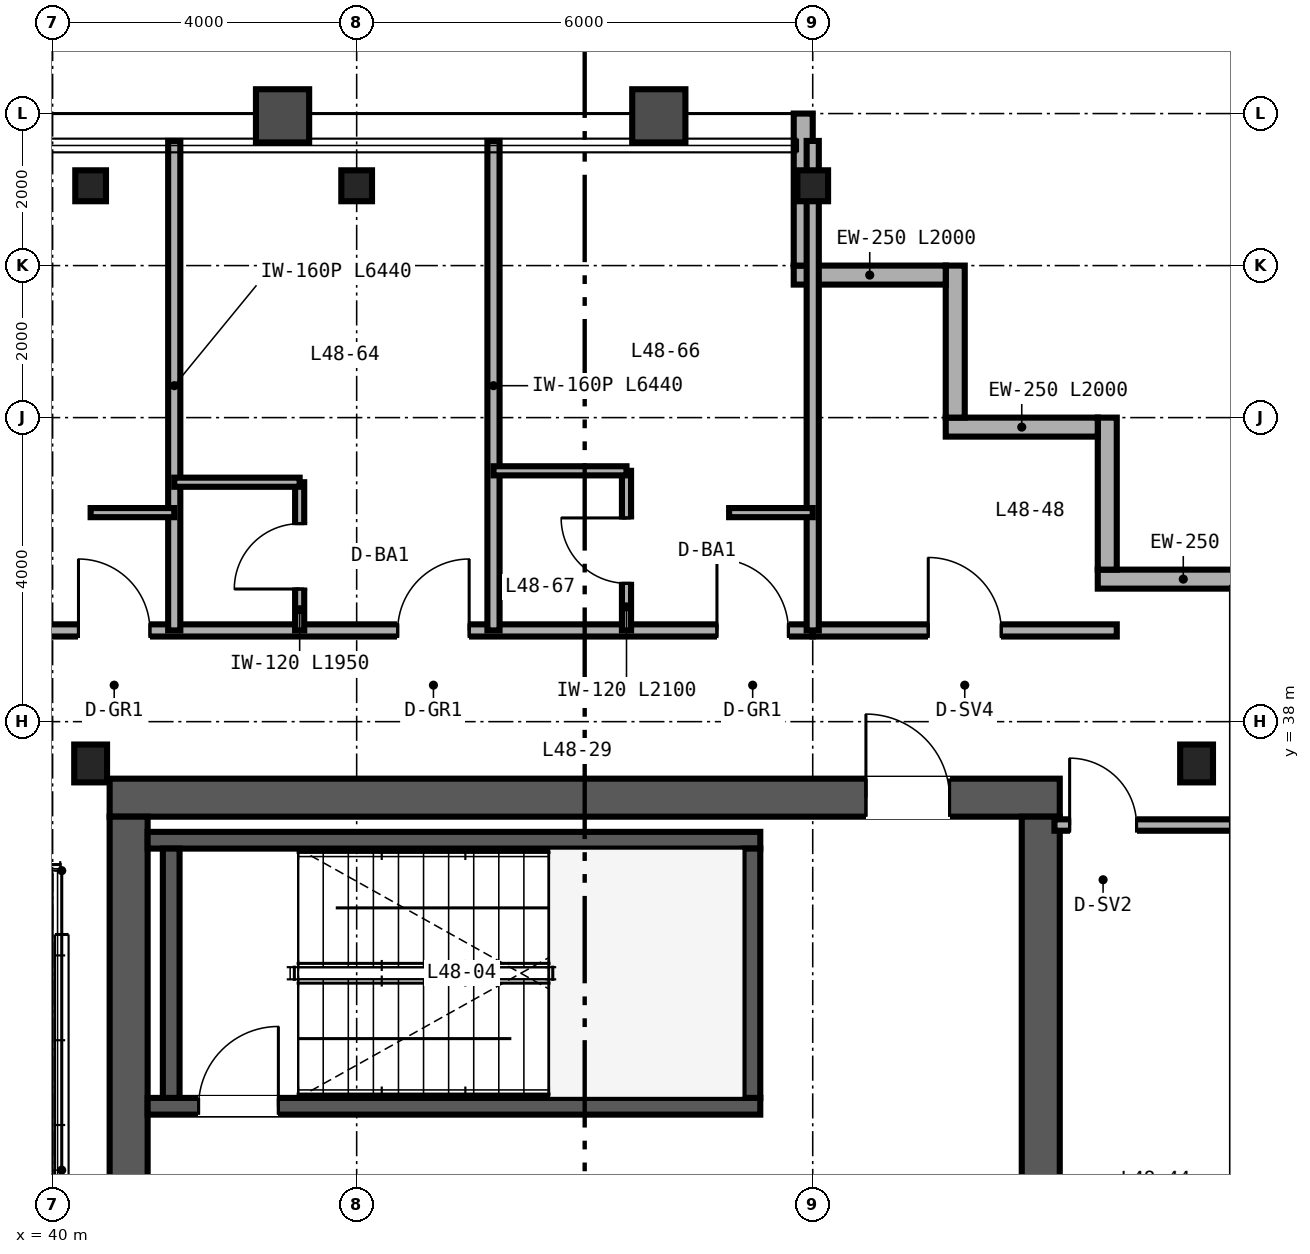
"""IFC4 building model, lengths in metres.
Left out: names, types, materials, properties, quantities, classifications, styles, units other than length and angle.
Written with IfcOpenShell. Run it as: python <this file> out.ifc"""

import sys

from ifc_helpers import new_model, si_unit, direction, frame, frame_2d, origin, origin_2d, place, context, subcontext, project, spatial, rectangle, i_section, extrude, source, transform, mapped, element, fill, save


model = new_model("IFC4")
c1 = context("Model", 3, precision=1e-05, world=origin(), true_north=direction((0.0, 1.0)))
c2 = subcontext(c1, "Body", "Model", "MODEL_VIEW")
j1 = project(units=[si_unit("LENGTHUNIT", "METRE"), si_unit("PLANEANGLEUNIT", "RADIAN")], contexts=[c1])
p1 = place(None, origin())
s1 = spatial("IfcSite", under=j1, at=p1, CompositionType="ELEMENT")
p2 = place(p1, origin())
s2 = spatial("IfcBuilding", under=s1, at=p2, CompositionType="ELEMENT")
p3 = place(p2, frame((0.0, 0.0, 192.0)))
s3 = spatial("IfcBuildingStorey", under=s2, at=p3, CompositionType="ELEMENT", Elevation=192.0)
p4 = place(p3, frame((40.75, 37.0, 0.0), z_axis=(0.0, 0.0, 1.0), x_axis=(1.0, 0.0, 0.0)))
e1 = element("IfcWall", 1, at=p4, inside=s3, PredefinedType="SHEAR", context=c2, shape_type="SweptSolid", body=[
    extrude(rectangle(XDim=12.5, YDim=0.5, at=frame_2d((6.25, 0.0))), origin(), (0.0, 0.0, 1.0), 3.37),
])
p5 = place(p4, frame((9.95, 0.0, 0.0)))
e2 = element("IfcOpeningElement", 2, at=p5, cuts=e1, PredefinedType="OPENING", context=c2, shape_type="SweptSolid", body=[
    extrude(rectangle(XDim=1.1, YDim=2.15, at=frame_2d((0.55, 1.075))), frame((0.0, 0.26, 0.0), z_axis=(0.0, -1.0, 0.0), x_axis=(1.0, 0.0, 0.0)), (0.0, 0.0, 1.0), 0.52),
])
for number, where, z_axis, x_axis in (
    (3, (41.0, 15.25, 0.0), (0.0, 0.0, 1.0), (0.0, 1.0, 0.0)),
    (4, (53.0, 15.25, 0.0), (0.0, 0.0, 1.0), (0.0, 1.0, 0.0)),
):
    element("IfcWall", number, at=place(p3, frame(where, z_axis=z_axis, x_axis=x_axis)), inside=s3, PredefinedType="SHEAR", context=c2, shape_type="SweptSolid", body=[
        extrude(rectangle(XDim=21.5, YDim=0.5, at=frame_2d((10.75, 0.0))), origin(), (0.0, 0.0, 1.0), 3.37),
    ])
p6 = place(p3, frame((41.25, 32.94, 0.0), z_axis=(0.0, 0.0, 1.0), x_axis=(1.0, 0.0, 0.0)))
e5 = element("IfcWall", 5, at=p6, inside=s3, PredefinedType="SHEAR", context=c2, shape_type="SweptSolid", body=[
    extrude(rectangle(XDim=8.06, YDim=0.22, at=frame_2d((4.03, 0.0))), origin(), (0.0, 0.0, 1.0), 3.4),
])
p7 = place(p6, frame((0.67, 0.0, 0.0)))
e6 = element("IfcOpeningElement", 6, at=p7, cuts=e5, PredefinedType="OPENING", context=c2, shape_type="SweptSolid", body=[
    extrude(rectangle(XDim=1.05, YDim=2.15, at=frame_2d((0.525, 1.075))), frame((0.0, 0.12, 0.0), z_axis=(0.0, -1.0, 0.0), x_axis=(1.0, 0.0, 0.0)), (0.0, 0.0, 1.0), 0.24),
])
p8 = place(p3, frame((41.25, 36.44, 0.0), z_axis=(0.0, 0.0, 1.0), x_axis=(1.0, 0.0, 0.0)))
e7 = element("IfcWall", 7, at=p8, inside=s3, PredefinedType="SHEAR", context=c2, shape_type="SweptSolid", body=[
    extrude(rectangle(XDim=8.06, YDim=0.22, at=frame_2d((4.03, 0.0))), origin(), (0.0, 0.0, 1.0), 3.4),
])
for number, where, z_axis, x_axis in (
    (8, (41.56, 33.05, 0.0), (0.0, 0.0, 1.0), (0.0, 1.0, 0.0)),
    (9, (49.2, 33.05, 0.0), (0.0, 0.0, 1.0), (0.0, 1.0, 0.0)),
):
    element("IfcWall", number, at=place(p3, frame(where, z_axis=z_axis, x_axis=x_axis)), inside=s3, PredefinedType="SHEAR", context=c2, shape_type="SweptSolid", body=[
        extrude(rectangle(XDim=3.28, YDim=0.22, at=frame_2d((1.64, 0.0))), origin(), (0.0, 0.0, 1.0), 3.4),
    ])
m1 = source(origin(), c2, "Body", "SweptSolid", [
    extrude(i_section(OverallWidth=0.432, OverallDepth=0.498, WebThickness=0.056, FlangeThickness=0.089, FilletRadius=0.025, at=origin_2d()), origin(), (0.0, 0.0, 1.0), 3.37),
])
for number, where, z_axis, x_axis in (
    (10, (40.5, 37.45, 0.0), (0.0, 0.0, 1.0), (1.0, 0.0, 0.0)),
    (11, (55.05, 37.45, 0.0), (0.0, 0.0, 1.0), (1.0, 0.0, 0.0)),
):
    element("IfcColumn", number, at=place(p3, frame(where, z_axis=z_axis, x_axis=x_axis)), inside=s3, PredefinedType="COLUMN", context=c2, shape_type="MappedRepresentation", body=[
        mapped(m1, transform((0.0, 0.0, 0.0), scale=1.0)),
    ])
m2 = source(origin(), c2, "Body", "SweptSolid", [
    extrude(i_section(OverallWidth=0.404, OverallDepth=0.407, WebThickness=0.027, FlangeThickness=0.044, FilletRadius=0.025, at=origin_2d()), origin(), (0.0, 0.0, 1.0), 3.37),
])
for number, where, z_axis, x_axis in (
    (12, (40.5, 45.05, 0.0), (0.0, 0.0, 1.0), (1.0, 0.0, 0.0)),
    (13, (44.0, 45.05, 0.0), (0.0, 0.0, 1.0), (1.0, 0.0, 0.0)),
    (14, (50.0, 45.05, 0.0), (0.0, 0.0, 1.0), (1.0, 0.0, 0.0)),
):
    element("IfcColumn", number, at=place(p3, frame(where, z_axis=z_axis, x_axis=x_axis)), inside=s3, PredefinedType="COLUMN", context=c2, shape_type="MappedRepresentation", body=[
        mapped(m2, transform((0.0, 0.0, 0.0), scale=1.0)),
    ])
p9 = place(p3, frame((56.0, 39.875, 0.0), z_axis=(0.0, 0.0, 1.0), x_axis=(-1.0, 0.0, 0.0)))
e15 = element("IfcWall", 15, at=p9, inside=s3, PredefinedType="SOLIDWALL", context=c2, shape_type="SweptSolid", body=[
    extrude(rectangle(XDim=2.25, YDim=0.25, at=frame_2d((1.125, 0.0))), origin(), (0.0, 0.0, 1.0), 3.37),
])
for number, where, z_axis, x_axis in (
    (16, (53.875, 40.0, 0.0), (0.0, 0.0, 1.0), (0.0, 1.0, 0.0)),
    (17, (53.75, 41.875, 0.0), (0.0, 0.0, 1.0), (-1.0, 0.0, 0.0)),
    (18, (51.875, 42.0, 0.0), (0.0, 0.0, 1.0), (0.0, 1.0, 0.0)),
    (19, (51.75, 43.875, 0.0), (0.0, 0.0, 1.0), (-1.0, 0.0, 0.0)),
):
    element("IfcWall", number, at=place(p3, frame(where, z_axis=z_axis, x_axis=x_axis)), inside=s3, PredefinedType="SOLIDWALL", context=c2, shape_type="SweptSolid", body=[
        extrude(rectangle(XDim=2.0, YDim=0.25, at=frame_2d((1.0, 0.0))), origin(), (0.0, 0.0, 1.0), 3.37),
    ])
p10 = place(p3, frame((49.875, 44.0, 0.0), z_axis=(0.0, 0.0, 1.0), x_axis=(0.0, 1.0, 0.0)))
e20 = element("IfcWall", 20, at=p10, inside=s3, PredefinedType="SOLIDWALL", context=c2, shape_type="SweptSolid", body=[
    extrude(rectangle(XDim=2.0, YDim=0.25, at=frame_2d((1.0, 0.0))), origin(), (0.0, 0.0, 1.0), 2.677),
])
p11 = place(p3, frame((53.18, 36.64, 0.0), z_axis=(0.0, 0.0, 1.0), x_axis=(1.0, 0.0, 0.0)))
e21 = element("IfcWall", 21, at=p11, inside=s3, PredefinedType="PARTITIONING", context=c2, shape_type="SweptSolid", body=[
    extrude(rectangle(XDim=2.66, YDim=0.15, at=frame_2d((1.33, 0.0))), origin(), (0.0, 0.0, 1.0), 2.753),
])
p12 = place(p11, frame((0.2, 0.0, 0.0)))
e22 = element("IfcOpeningElement", 22, at=p12, cuts=e21, PredefinedType="OPENING", context=c2, shape_type="SweptSolid", body=[
    extrude(rectangle(XDim=0.88, YDim=2.15, at=frame_2d((0.44, 1.075))), frame((0.0, 0.085, 0.0), z_axis=(0.0, -1.0, 0.0), x_axis=(1.0, 0.0, 0.0)), (0.0, 0.0, 1.0), 0.17),
])
p13 = place(p3, frame((50.0, 39.2, 0.0), z_axis=(0.0, 0.0, 1.0), x_axis=(1.0, 0.0, 0.0)))
e23 = element("IfcWall", 23, at=p13, inside=s3, PredefinedType="PARTITIONING", context=c2, shape_type="SweptSolid", body=[
    extrude(rectangle(XDim=4.0, YDim=0.16, at=frame_2d((2.0, 0.0))), origin(), (0.0, 0.0, 1.0), 3.37),
])
p14 = place(p13, frame((1.52, 0.0, 0.0)))
e24 = element("IfcOpeningElement", 24, at=p14, cuts=e23, PredefinedType="OPENING", context=c2, shape_type="SweptSolid", body=[
    extrude(rectangle(XDim=0.96, YDim=2.15, at=frame_2d((0.48, 1.075))), frame((0.0, 0.09, 0.0), z_axis=(0.0, -1.0, 0.0), x_axis=(1.0, 0.0, 0.0)), (0.0, 0.0, 1.0), 0.18),
])
p15 = place(p3, frame((14.0, 39.2, 0.0), z_axis=(0.0, 0.0, 1.0), x_axis=(1.0, 0.0, 0.0)))
e25 = element("IfcWall", 25, at=p15, inside=s3, PredefinedType="PARTITIONING", context=c2, shape_type="SweptSolid", body=[
    extrude(rectangle(XDim=36.0, YDim=0.16, at=frame_2d((18.0, 0.0))), origin(), (0.0, 0.0, 1.0), 2.913),
])
p16 = place(p15, frame((3.94, 0.0, 0.0)))
e26 = element("IfcOpeningElement", 26, at=p16, cuts=e25, PredefinedType="OPENING", context=c2, shape_type="SweptSolid", body=[
    extrude(rectangle(XDim=0.94, YDim=2.15, at=frame_2d((0.47, 1.075))), frame((0.0, 0.09, 0.0), z_axis=(0.0, -1.0, 0.0), x_axis=(1.0, 0.0, 0.0)), (0.0, 0.0, 1.0), 0.18),
])
p17 = place(p15, frame((9.14, 0.0, 0.0)))
e27 = element("IfcOpeningElement", 27, at=p17, cuts=e25, PredefinedType="OPENING", context=c2, shape_type="SweptSolid", body=[
    extrude(rectangle(XDim=0.94, YDim=2.15, at=frame_2d((0.47, 1.075))), frame((0.0, 0.09, 0.0), z_axis=(0.0, -1.0, 0.0), x_axis=(1.0, 0.0, 0.0)), (0.0, 0.0, 1.0), 0.18),
])
p18 = place(p15, frame((12.72, 0.0, 0.0)))
e28 = element("IfcOpeningElement", 28, at=p18, cuts=e25, PredefinedType="OPENING", context=c2, shape_type="SweptSolid", body=[
    extrude(rectangle(XDim=0.96, YDim=2.15, at=frame_2d((0.48, 1.075))), frame((0.0, 0.09, 0.0), z_axis=(0.0, -1.0, 0.0), x_axis=(1.0, 0.0, 0.0)), (0.0, 0.0, 1.0), 0.18),
])
p19 = place(p15, frame((18.42, 0.0, 0.0)))
e29 = element("IfcOpeningElement", 29, at=p19, cuts=e25, PredefinedType="OPENING", context=c2, shape_type="SweptSolid", body=[
    extrude(rectangle(XDim=0.96, YDim=2.15, at=frame_2d((0.48, 1.075))), frame((0.0, 0.09, 0.0), z_axis=(0.0, -1.0, 0.0), x_axis=(1.0, 0.0, 0.0)), (0.0, 0.0, 1.0), 0.18),
])
p20 = place(p15, frame((26.34, 0.0, 0.0)))
e30 = element("IfcOpeningElement", 30, at=p20, cuts=e25, PredefinedType="OPENING", context=c2, shape_type="SweptSolid", body=[
    extrude(rectangle(XDim=0.94, YDim=2.15, at=frame_2d((0.47, 1.075))), frame((0.0, 0.09, 0.0), z_axis=(0.0, -1.0, 0.0), x_axis=(1.0, 0.0, 0.0)), (0.0, 0.0, 1.0), 0.18),
])
p21 = place(p15, frame((30.54, 0.0, 0.0)))
e31 = element("IfcOpeningElement", 31, at=p21, cuts=e25, PredefinedType="OPENING", context=c2, shape_type="SweptSolid", body=[
    extrude(rectangle(XDim=0.94, YDim=2.15, at=frame_2d((0.47, 1.075))), frame((0.0, 0.09, 0.0), z_axis=(0.0, -1.0, 0.0), x_axis=(1.0, 0.0, 0.0)), (0.0, 0.0, 1.0), 0.18),
])
p22 = place(p15, frame((34.74, 0.0, 0.0)))
e32 = element("IfcOpeningElement", 32, at=p22, cuts=e25, PredefinedType="OPENING", context=c2, shape_type="SweptSolid", body=[
    extrude(rectangle(XDim=0.94, YDim=2.15, at=frame_2d((0.47, 1.075))), frame((0.0, 0.09, 0.0), z_axis=(0.0, -1.0, 0.0), x_axis=(1.0, 0.0, 0.0)), (0.0, 0.0, 1.0), 0.18),
])
p23 = place(p3, frame((50.0, 39.2, 0.0), z_axis=(0.0, 0.0, 1.0), x_axis=(0.0, 1.0, 0.0)))
e33 = element("IfcWall", 33, at=p23, inside=s3, PredefinedType="PARTITIONING", context=c2, shape_type="SweptSolid", body=[
    extrude(rectangle(XDim=6.44, YDim=0.16, at=frame_2d((3.22, 0.0))), origin(), (0.0, 0.0, 1.0), 2.677),
])
p24 = place(p3, frame((41.6, 39.2, 0.0), z_axis=(0.0, 0.0, 1.0), x_axis=(0.0, 1.0, 0.0)))
e34 = element("IfcWall", 34, at=p24, inside=s3, PredefinedType="PARTITIONING", context=c2, shape_type="SweptSolid", body=[
    extrude(rectangle(XDim=6.44, YDim=0.16, at=frame_2d((3.22, 0.0))), origin(), (0.0, 0.0, 1.0), 2.833),
])
p25 = place(p3, frame((40.5, 40.75, 0.0), z_axis=(0.0, 0.0, 1.0), x_axis=(1.0, 0.0, 0.0)))
e35 = element("IfcWall", 35, at=p25, inside=s3, PredefinedType="PARTITIONING", context=c2, shape_type="SweptSolid", body=[
    extrude(rectangle(XDim=1.1, YDim=0.12, at=frame_2d((0.55, 0.0))), origin(), (0.0, 0.0, 1.0), 2.913),
])
p26 = place(p3, frame((45.8, 39.2, 0.0), z_axis=(0.0, 0.0, 1.0), x_axis=(0.0, 1.0, 0.0)))
e36 = element("IfcWall", 36, at=p26, inside=s3, PredefinedType="PARTITIONING", context=c2, shape_type="SweptSolid", body=[
    extrude(rectangle(XDim=6.44, YDim=0.16, at=frame_2d((3.22, 0.0))), origin(), (0.0, 0.0, 1.0), 2.677),
])
p27 = place(p3, frame((43.25, 39.2, 0.0), z_axis=(0.0, 0.0, 1.0), x_axis=(0.0, 1.0, 0.0)))
e37 = element("IfcWall", 37, at=p27, inside=s3, PredefinedType="PARTITIONING", context=c2, shape_type="SweptSolid", body=[
    extrude(rectangle(XDim=1.95, YDim=0.12, at=frame_2d((0.975, 0.0))), origin(), (0.0, 0.0, 1.0), 3.37),
])
p28 = place(p27, frame((0.545, 0.0, 0.0)))
e38 = element("IfcOpeningElement", 38, at=p28, cuts=e37, PredefinedType="OPENING", context=c2, shape_type="SweptSolid", body=[
    extrude(rectangle(XDim=0.86, YDim=2.1, at=frame_2d((0.43, 1.05))), frame((0.0, 0.07, 0.0), z_axis=(0.0, -1.0, 0.0), x_axis=(1.0, 0.0, 0.0)), (0.0, 0.0, 1.0), 0.14),
])
p29 = place(p3, frame((41.6, 41.15, 0.0), z_axis=(0.0, 0.0, 1.0), x_axis=(1.0, 0.0, 0.0)))
e39 = element("IfcWall", 39, at=p29, inside=s3, PredefinedType="PARTITIONING", context=c2, shape_type="SweptSolid", body=[
    extrude(rectangle(XDim=1.65, YDim=0.12, at=frame_2d((0.825, 0.0))), origin(), (0.0, 0.0, 1.0), 3.37),
])
p30 = place(p3, frame((47.55, 39.2, 0.0), z_axis=(0.0, 0.0, 1.0), x_axis=(0.0, 1.0, 0.0)))
e40 = element("IfcWall", 40, at=p30, inside=s3, PredefinedType="PARTITIONING", context=c2, shape_type="SweptSolid", body=[
    extrude(rectangle(XDim=2.1, YDim=0.12, at=frame_2d((1.05, 0.0))), origin(), (0.0, 0.0, 1.0), 3.37),
])
p31 = place(p30, frame((0.62, 0.0, 0.0)))
e41 = element("IfcOpeningElement", 41, at=p31, cuts=e40, PredefinedType="OPENING", context=c2, shape_type="SweptSolid", body=[
    extrude(rectangle(XDim=0.86, YDim=2.1, at=frame_2d((0.43, 1.05))), frame((0.0, 0.07, 0.0), z_axis=(0.0, -1.0, 0.0), x_axis=(1.0, 0.0, 0.0)), (0.0, 0.0, 1.0), 0.14),
])
p32 = place(p3, frame((45.8, 41.3, 0.0), z_axis=(0.0, 0.0, 1.0), x_axis=(1.0, 0.0, 0.0)))
e42 = element("IfcWall", 42, at=p32, inside=s3, PredefinedType="PARTITIONING", context=c2, shape_type="SweptSolid", body=[
    extrude(rectangle(XDim=1.75, YDim=0.12, at=frame_2d((0.875, 0.0))), origin(), (0.0, 0.0, 1.0), 3.37),
])
p33 = place(p3, frame((48.9, 40.75, 0.0), z_axis=(0.0, 0.0, 1.0), x_axis=(1.0, 0.0, 0.0)))
e43 = element("IfcWall", 43, at=p33, inside=s3, PredefinedType="PARTITIONING", context=c2, shape_type="SweptSolid", body=[
    extrude(rectangle(XDim=1.1, YDim=0.12, at=frame_2d((0.55, 0.0))), origin(), (0.0, 0.0, 1.0), 3.37),
])
m3 = source(origin(), c2, "Body", "SweptSolid", [
    extrude(rectangle(XDim=1.05, YDim=2.15, at=frame_2d((0.525, 1.075))), frame((0.0, 0.025, 0.0), z_axis=(0.0, -1.0, 0.0), x_axis=(1.0, 0.0, 0.0)), (0.0, 0.0, 1.0), 0.05),
])
p34 = place(p7, origin())
e44 = element("IfcDoor", 44, at=p34, inside=s3, OperationType="SINGLE_SWING_RIGHT", PredefinedType="DOOR", context=c2, shape_type="MappedRepresentation", body=[
    mapped(m3, transform((0.0, 0.0, 0.0), scale=1.0)),
])
fill(e6, e44)
m4 = source(origin(), c2, "Body", "SweptSolid", [
    extrude(rectangle(XDim=1.1, YDim=2.15, at=frame_2d((0.55, 1.075))), frame((0.0, 0.025, 0.0), z_axis=(0.0, -1.0, 0.0), x_axis=(1.0, 0.0, 0.0)), (0.0, 0.0, 1.0), 0.05),
])
p35 = place(p5, origin())
e45 = element("IfcDoor", 45, at=p35, inside=s3, OperationType="SINGLE_SWING_LEFT", PredefinedType="DOOR", context=c2, shape_type="MappedRepresentation", body=[
    mapped(m4, transform((0.0, 0.0, 0.0), scale=1.0)),
])
fill(e2, e45)
m5 = source(origin(), c2, "Body", "SweptSolid", [
    extrude(rectangle(XDim=0.88, YDim=2.15, at=frame_2d((0.44, 1.075))), frame((0.0, 0.025, 0.0), z_axis=(0.0, -1.0, 0.0), x_axis=(1.0, 0.0, 0.0)), (0.0, 0.0, 1.0), 0.05),
])
p36 = place(p12, origin())
e46 = element("IfcDoor", 46, at=p36, inside=s3, OperationType="SINGLE_SWING_LEFT", PredefinedType="DOOR", context=c2, shape_type="MappedRepresentation", body=[
    mapped(m5, transform((0.0, 0.0, 0.0), scale=1.0)),
])
fill(e22, e46)
m6 = source(origin(), c2, "Body", "SweptSolid", [
    extrude(rectangle(XDim=0.96, YDim=2.15, at=frame_2d((0.48, 1.075))), frame((0.0, 0.025, 0.0), z_axis=(0.0, -1.0, 0.0), x_axis=(1.0, 0.0, 0.0)), (0.0, 0.0, 1.0), 0.05),
])
p37 = place(p14, origin())
e47 = element("IfcDoor", 47, at=p37, inside=s3, OperationType="SINGLE_SWING_LEFT", PredefinedType="DOOR", context=c2, shape_type="MappedRepresentation", body=[
    mapped(m6, transform((0.0, 0.0, 0.0), scale=1.0)),
])
fill(e24, e47)
m7 = source(origin(), c2, "Body", "SweptSolid", [
    extrude(rectangle(XDim=0.86, YDim=2.1, at=frame_2d((0.43, 1.05))), frame((0.0, 0.025, 0.0), z_axis=(0.0, -1.0, 0.0), x_axis=(1.0, 0.0, 0.0)), (0.0, 0.0, 1.0), 0.05),
])
p38 = place(p28, origin())
e48 = element("IfcDoor", 48, at=p38, inside=s3, OperationType="SINGLE_SWING_LEFT", PredefinedType="DOOR", context=c2, shape_type="MappedRepresentation", body=[
    mapped(m7, transform((0.0, 0.0, 0.0), scale=1.0)),
])
fill(e38, e48)
p39 = place(p31, origin())
e49 = element("IfcDoor", 49, at=p39, inside=s3, OperationType="SINGLE_SWING_RIGHT", PredefinedType="DOOR", context=c2, shape_type="MappedRepresentation", body=[
    mapped(m7, transform((0.0, 0.0, 0.0), scale=1.0)),
])
fill(e41, e49)
m8 = source(origin(), c2, "Body", "SweptSolid", [
    extrude(rectangle(XDim=0.94, YDim=2.15, at=frame_2d((0.47, 1.075))), frame((0.0, 0.025, 0.0), z_axis=(0.0, -1.0, 0.0), x_axis=(1.0, 0.0, 0.0)), (0.0, 0.0, 1.0), 0.05),
])
p40 = place(p20, origin())
e50 = element("IfcDoor", 50, at=p40, inside=s3, OperationType="SINGLE_SWING_LEFT", PredefinedType="DOOR", context=c2, shape_type="MappedRepresentation", body=[
    mapped(m8, transform((0.0, 0.0, 0.0), scale=1.0)),
])
fill(e30, e50)
p41 = place(p21, origin())
e51 = element("IfcDoor", 51, at=p41, inside=s3, OperationType="SINGLE_SWING_RIGHT", PredefinedType="DOOR", context=c2, shape_type="MappedRepresentation", body=[
    mapped(m8, transform((0.0, 0.0, 0.0), scale=1.0)),
])
fill(e31, e51)
p42 = place(p22, origin())
e52 = element("IfcDoor", 52, at=p42, inside=s3, OperationType="SINGLE_SWING_LEFT", PredefinedType="DOOR", context=c2, shape_type="MappedRepresentation", body=[
    mapped(m8, transform((0.0, 0.0, 0.0), scale=1.0)),
])
fill(e32, e52)
save(model, sys.argv[1])
